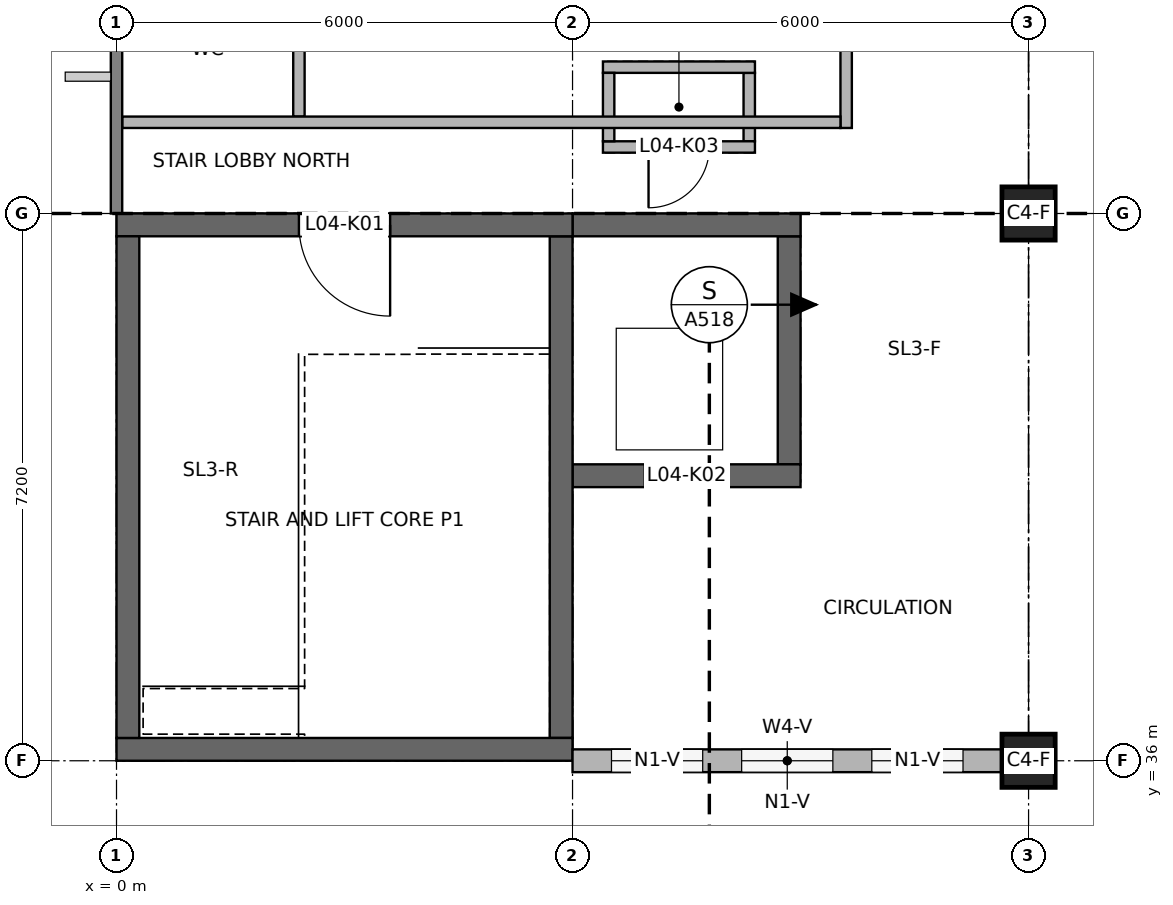
"""IFC4 building model, lengths in metres.
Left out: names, types, materials, properties, quantities, classifications, styles, units other than length and angle.
Written with IfcOpenShell. Run it as: python <this file> out.ifc"""

import sys

from ifc_helpers import new_model, si_unit, direction, frame, frame_2d, origin, origin_2d, place, context, subcontext, project, spatial, rectangle, extrude, element, fill, save


model = new_model("IFC4")
c1 = context("Model", 3, precision=1e-05, world=origin(), true_north=direction((0.0, 1.0)))
c2 = subcontext(c1, "Body", "Model", "MODEL_VIEW")
j1 = project(units=[si_unit("LENGTHUNIT", "METRE"), si_unit("PLANEANGLEUNIT", "RADIAN")], contexts=[c1])
p1 = place(None, origin())
s1 = spatial("IfcSite", under=j1, at=p1, CompositionType="ELEMENT")
p2 = place(p1, origin())
s2 = spatial("IfcBuilding", under=s1, at=p2, CompositionType="ELEMENT")
p3 = place(p2, frame((0.0, 0.0, 16.8)))
s3 = spatial("IfcBuildingStorey", under=s2, at=p3, CompositionType="ELEMENT", Elevation=16.8)
p4 = place(p3, frame((0.0, 36.15, 0.0), z_axis=(0.0, 0.0, 1.0), x_axis=(1.0, 0.0, 0.0)))
e1 = element("IfcWall", 1, at=p4, inside=s3, PredefinedType="SHEAR", context=c2, shape_type="SweptSolid", body=[
    extrude(rectangle(XDim=6.0, YDim=0.3, at=frame_2d((3.0, 0.0))), origin(), (0.0, 0.0, 1.0), 3.95),
])
p5 = place(p3, frame((0.0, 43.05, 0.0), z_axis=(0.0, 0.0, 1.0), x_axis=(1.0, 0.0, 0.0)))
e2 = element("IfcWall", 2, at=p5, inside=s3, PredefinedType="SHEAR", context=c2, shape_type="SweptSolid", body=[
    extrude(rectangle(XDim=6.0, YDim=0.3, at=frame_2d((3.0, 0.0))), origin(), (0.0, 0.0, 1.0), 3.95),
])
p6 = place(p5, frame((2.4, 0.0, 0.0)))
e3 = element("IfcOpeningElement", 3, at=p6, cuts=e2, PredefinedType="OPENING", context=c2, shape_type="SweptSolid", body=[
    extrude(rectangle(XDim=1.2, YDim=2.1, at=frame_2d((0.6, 1.05))), frame((0.0, 0.16, 0.0), z_axis=(0.0, -1.0, 0.0), x_axis=(1.0, 0.0, 0.0)), (0.0, 0.0, 1.0), 0.32),
])
for number, where, z_axis, x_axis in (
    (4, (0.15, 36.3, 0.0), (0.0, 0.0, 1.0), (0.0, 1.0, 0.0)),
    (5, (5.85, 36.3, 0.0), (0.0, 0.0, 1.0), (0.0, 1.0, 0.0)),
):
    element("IfcWall", number, at=place(p3, frame(where, z_axis=z_axis, x_axis=x_axis)), inside=s3, PredefinedType="SHEAR", context=c2, shape_type="SweptSolid", body=[
        extrude(rectangle(XDim=6.6, YDim=0.3, at=frame_2d((3.3, 0.0))), origin(), (0.0, 0.0, 1.0), 3.95),
    ])
p7 = place(p3, frame((6.0, 39.75, 0.0), z_axis=(0.0, 0.0, 1.0), x_axis=(1.0, 0.0, 0.0)))
e6 = element("IfcWall", 6, at=p7, inside=s3, PredefinedType="SHEAR", context=c2, shape_type="SweptSolid", body=[
    extrude(rectangle(XDim=3.0, YDim=0.3, at=frame_2d((1.5, 0.0))), origin(), (0.0, 0.0, 1.0), 5.75),
])
p8 = place(p7, frame((0.95, 0.0, 0.0)))
e7 = element("IfcOpeningElement", 7, at=p8, cuts=e6, PredefinedType="OPENING", context=c2, shape_type="SweptSolid", body=[
    extrude(rectangle(XDim=1.1, YDim=2.1, at=frame_2d((0.55, 1.05))), frame((0.0, 0.16, 0.0), z_axis=(0.0, -1.0, 0.0), x_axis=(1.0, 0.0, 0.0)), (0.0, 0.0, 1.0), 0.32),
])
for number, where, z_axis, x_axis in (
    (8, (6.0, 43.05, 0.0), (0.0, 0.0, 1.0), (1.0, 0.0, 0.0)),
    (9, (8.85, 39.9, 0.0), (0.0, 0.0, 1.0), (0.0, 1.0, 0.0)),
):
    element("IfcWall", number, at=place(p3, frame(where, z_axis=z_axis, x_axis=x_axis)), inside=s3, PredefinedType="SHEAR", context=c2, shape_type="SweptSolid", body=[
        extrude(rectangle(XDim=3.0, YDim=0.3, at=frame_2d((1.5, 0.0))), origin(), (0.0, 0.0, 1.0), 5.75),
    ])
p9 = place(p3, frame((6.4, 44.075, 0.0), z_axis=(0.0, 0.0, 1.0), x_axis=(1.0, 0.0, 0.0)))
e10 = element("IfcWall", 10, at=p9, inside=s3, PredefinedType="SOLIDWALL", context=c2, shape_type="SweptSolid", body=[
    extrude(rectangle(XDim=2.0, YDim=0.15, at=frame_2d((1.0, 0.0))), origin(), (0.0, 0.0, 1.0), 3.95),
])
p10 = place(p9, frame((0.6, 0.0, 0.0)))
e11 = element("IfcOpeningElement", 11, at=p10, cuts=e10, PredefinedType="OPENING", context=c2, shape_type="SweptSolid", body=[
    extrude(rectangle(XDim=0.8, YDim=2.1, at=frame_2d((0.4, 1.05))), frame((0.0, 0.085, 0.0), z_axis=(0.0, -1.0, 0.0), x_axis=(1.0, 0.0, 0.0)), (0.0, 0.0, 1.0), 0.17),
])
p11 = place(p3, frame((6.4, 45.125, 0.0), z_axis=(0.0, 0.0, 1.0), x_axis=(1.0, 0.0, 0.0)))
e12 = element("IfcWall", 12, at=p11, inside=s3, PredefinedType="SOLIDWALL", context=c2, shape_type="SweptSolid", body=[
    extrude(rectangle(XDim=2.0, YDim=0.15, at=frame_2d((1.0, 0.0))), origin(), (0.0, 0.0, 1.0), 3.95),
])
for number, where, z_axis, x_axis in (
    (13, (6.475, 44.15, 0.0), (0.0, 0.0, 1.0), (0.0, 1.0, 0.0)),
    (14, (8.325, 44.15, 0.0), (0.0, 0.0, 1.0), (0.0, 1.0, 0.0)),
):
    element("IfcWall", number, at=place(p3, frame(where, z_axis=z_axis, x_axis=x_axis)), inside=s3, PredefinedType="SOLIDWALL", context=c2, shape_type="SweptSolid", body=[
        extrude(rectangle(XDim=0.9, YDim=0.15, at=frame_2d((0.45, 0.0))), origin(), (0.0, 0.0, 1.0), 3.95),
    ])
for number, where, z_axis, x_axis in (
    (15, (12.0, 36.0, 0.0), (0.0, 0.0, 1.0), (1.0, 0.0, 0.0)),
    (16, (12.0, 43.2, 0.0), (0.0, 0.0, 1.0), (1.0, 0.0, 0.0)),
):
    element("IfcColumn", number, at=place(p3, frame(where, z_axis=z_axis, x_axis=x_axis)), inside=s3, PredefinedType="COLUMN", context=c2, shape_type="SweptSolid", body=[
        extrude(rectangle(XDim=0.7, YDim=0.7, at=origin_2d()), origin(), (0.0, 0.0, 1.0), 3.95),
    ])
p12 = place(p3, frame((6.0, 36.0, 0.0), z_axis=(0.0, 0.0, 1.0), x_axis=(1.0, 0.0, 0.0)))
e17 = element("IfcWall", 17, at=p12, inside=s3, PredefinedType="SOLIDWALL", context=c2, shape_type="SweptSolid", body=[
    extrude(rectangle(XDim=5.65, YDim=0.3, at=frame_2d((2.825, 0.0))), origin(), (0.0, 0.0, 1.0), 3.15),
])
p13 = place(p12, frame((0.512, 0.0, 0.9)))
e18 = element("IfcOpeningElement", 18, at=p13, cuts=e17, PredefinedType="OPENING", context=c2, shape_type="SweptSolid", body=[
    extrude(rectangle(XDim=1.2, YDim=1.5, at=frame_2d((0.6, 0.75))), frame((0.0, 0.16, 0.0), z_axis=(0.0, -1.0, 0.0), x_axis=(1.0, 0.0, 0.0)), (0.0, 0.0, 1.0), 0.32),
])
p14 = place(p12, frame((2.225, 0.0, 0.9)))
e19 = element("IfcOpeningElement", 19, at=p14, cuts=e17, PredefinedType="OPENING", context=c2, shape_type="SweptSolid", body=[
    extrude(rectangle(XDim=1.2, YDim=1.5, at=frame_2d((0.6, 0.75))), frame((0.0, 0.16, 0.0), z_axis=(0.0, -1.0, 0.0), x_axis=(1.0, 0.0, 0.0)), (0.0, 0.0, 1.0), 0.32),
])
p15 = place(p12, frame((3.938, 0.0, 0.9)))
e20 = element("IfcOpeningElement", 20, at=p15, cuts=e17, PredefinedType="OPENING", context=c2, shape_type="SweptSolid", body=[
    extrude(rectangle(XDim=1.2, YDim=1.5, at=frame_2d((0.6, 0.75))), frame((0.0, 0.16, 0.0), z_axis=(0.0, -1.0, 0.0), x_axis=(1.0, 0.0, 0.0)), (0.0, 0.0, 1.0), 0.32),
])
p16 = place(p3, frame((2.4, 44.475, 0.0), z_axis=(0.0, 0.0, 1.0), x_axis=(0.0, 1.0, 0.0)))
e21 = element("IfcWall", 21, at=p16, inside=s3, PredefinedType="PARTITIONING", context=c2, shape_type="SweptSolid", body=[
    extrude(rectangle(XDim=2.85, YDim=0.15, at=frame_2d((1.425, 0.0))), origin(), (0.0, 0.0, 1.0), 3.95),
])
p17 = place(p3, frame((9.6, 44.325, 0.0), z_axis=(0.0, 0.0, 1.0), x_axis=(0.0, 1.0, 0.0)))
e22 = element("IfcWall", 22, at=p17, inside=s3, PredefinedType="PARTITIONING", context=c2, shape_type="SweptSolid", body=[
    extrude(rectangle(XDim=3.15, YDim=0.15, at=frame_2d((1.575, 0.0))), origin(), (0.0, 0.0, 1.0), 3.95),
])
p18 = place(p3, frame((0.075, 44.4, 0.0), z_axis=(0.0, 0.0, 1.0), x_axis=(1.0, 0.0, 0.0)))
e23 = element("IfcWall", 23, at=p18, inside=s3, PredefinedType="PARTITIONING", context=c2, shape_type="SweptSolid", body=[
    extrude(rectangle(XDim=9.45, YDim=0.15, at=frame_2d((4.725, 0.0))), origin(), (0.0, 0.0, 1.0), 3.95),
])
p19 = place(p13, origin())
e24 = element("IfcWindow", 24, at=p19, inside=s3, PartitioningType="SINGLE_PANEL", PredefinedType="WINDOW", context=c2, shape_type="SweptSolid", body=[
    extrude(rectangle(XDim=1.2, YDim=1.5, at=frame_2d((0.6, 0.75))), frame((0.0, 0.03, 0.0), z_axis=(0.0, -1.0, 0.0), x_axis=(1.0, 0.0, 0.0)), (0.0, 0.0, 1.0), 0.06),
])
fill(e18, e24)
p20 = place(p14, origin())
e25 = element("IfcWindow", 25, at=p20, inside=s3, PartitioningType="SINGLE_PANEL", PredefinedType="WINDOW", context=c2, shape_type="SweptSolid", body=[
    extrude(rectangle(XDim=1.2, YDim=1.5, at=frame_2d((0.6, 0.75))), frame((0.0, 0.03, 0.0), z_axis=(0.0, -1.0, 0.0), x_axis=(1.0, 0.0, 0.0)), (0.0, 0.0, 1.0), 0.06),
])
fill(e19, e25)
p21 = place(p15, origin())
e26 = element("IfcWindow", 26, at=p21, inside=s3, PartitioningType="SINGLE_PANEL", PredefinedType="WINDOW", context=c2, shape_type="SweptSolid", body=[
    extrude(rectangle(XDim=1.2, YDim=1.5, at=frame_2d((0.6, 0.75))), frame((0.0, 0.03, 0.0), z_axis=(0.0, -1.0, 0.0), x_axis=(1.0, 0.0, 0.0)), (0.0, 0.0, 1.0), 0.06),
])
fill(e20, e26)
p22 = place(p6, frame((1.2, 0.0, 0.0), z_axis=(0.0, 0.0, 1.0), x_axis=(-1.0, 0.0, 0.0)))
e27 = element("IfcDoor", 27, at=p22, inside=s3, OperationType="SINGLE_SWING_LEFT", PredefinedType="DOOR", context=c2, shape_type="SweptSolid", body=[
    extrude(rectangle(XDim=1.2, YDim=2.1, at=frame_2d((0.6, 1.05))), frame((0.0, 0.025, 0.0), z_axis=(0.0, -1.0, 0.0), x_axis=(1.0, 0.0, 0.0)), (0.0, 0.0, 1.0), 0.05),
])
fill(e3, e27)
p23 = place(p8, origin())
e28 = element("IfcDoor", 28, at=p23, inside=s3, OperationType="DOUBLE_DOOR_SLIDING", PredefinedType="DOOR", context=c2, shape_type="SweptSolid", body=[
    extrude(rectangle(XDim=1.1, YDim=2.1, at=frame_2d((0.55, 1.05))), frame((0.0, 0.025, 0.0), z_axis=(0.0, -1.0, 0.0), x_axis=(1.0, 0.0, 0.0)), (0.0, 0.0, 1.0), 0.05),
])
fill(e7, e28)
p24 = place(p10, frame((0.8, 0.0, 0.0), z_axis=(0.0, 0.0, 1.0), x_axis=(-1.0, 0.0, 0.0)))
e29 = element("IfcDoor", 29, at=p24, inside=s3, OperationType="SINGLE_SWING_RIGHT", PredefinedType="DOOR", context=c2, shape_type="SweptSolid", body=[
    extrude(rectangle(XDim=0.8, YDim=2.1, at=frame_2d((0.4, 1.05))), frame((0.0, 0.025, 0.0), z_axis=(0.0, -1.0, 0.0), x_axis=(1.0, 0.0, 0.0)), (0.0, 0.0, 1.0), 0.05),
])
fill(e11, e29)
save(model, sys.argv[1])
